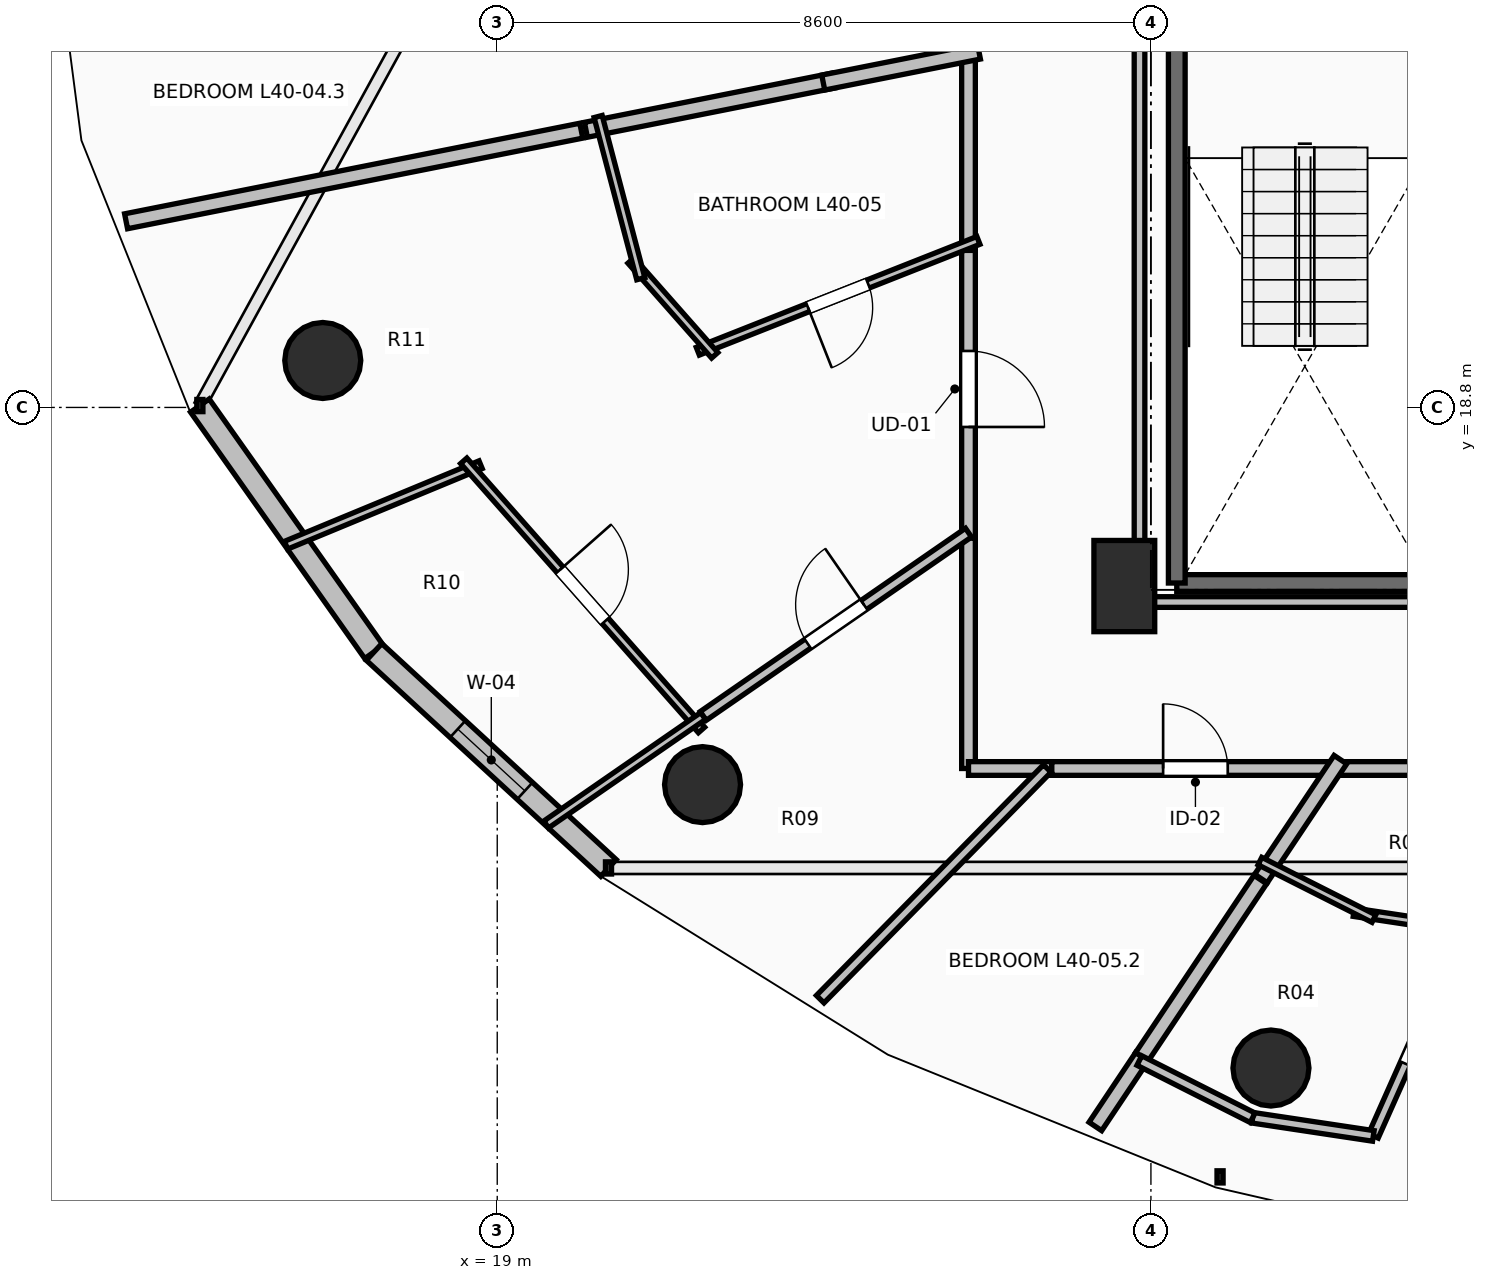
"""IFC4 building model, lengths in metres.
Left out: names, types, materials, properties, quantities, classifications, styles, units other than length and angle.
Written with IfcOpenShell. Run it as: python <this file> out.ifc"""

import sys

from ifc_helpers import new_model, si_unit, direction, frame, frame_2d, origin, origin_2d, place, context, subcontext, project, spatial, rectangle, circle, extrude, element, fill, save


model = new_model("IFC4")
c1 = context("Model", 3, precision=1e-05, world=origin(), true_north=direction((0.0, 1.0)))
c2 = subcontext(c1, "Body", "Model", "MODEL_VIEW")
j1 = project(units=[si_unit("LENGTHUNIT", "METRE"), si_unit("PLANEANGLEUNIT", "RADIAN")], contexts=[c1])
p1 = place(None, origin())
s1 = spatial("IfcSite", under=j1, at=p1, CompositionType="ELEMENT")
p2 = place(p1, origin())
s2 = spatial("IfcBuilding", under=s1, at=p2, CompositionType="ELEMENT")
p3 = place(p2, frame((0.0, 0.0, 150.1)))
s3 = spatial("IfcBuildingStorey", under=s2, at=p3, CompositionType="ELEMENT", Elevation=150.1)
for number, where, z_axis, x_axis in (
    (1, (16.705, 19.418, 0.0), (0.0, 0.0, 1.0), (-0.924, -0.383, 0.0)),
    (2, (21.701, 13.838, 0.0), (0.0, 0.0, 1.0), (-0.707, -0.707, 0.0)),
    (3, (29.179, 10.109, 0.0), (0.0, 0.0, 1.0), (-0.383, -0.924, 0.0)),
):
    element("IfcColumn", number, at=place(p3, frame(where, z_axis=z_axis, x_axis=x_axis)), inside=s3, PredefinedType="COLUMN", context=c2, shape_type="SweptSolid", body=[
        extrude(circle(Radius=0.5, at=origin_2d()), origin(), (0.0, 0.0, 1.0), 3.5),
    ])
p4 = place(p3, frame((27.25, 16.45, 0.0), z_axis=(0.0, 0.0, 1.0), x_axis=(1.0, 0.0, 0.0)))
e4 = element("IfcColumn", 4, at=p4, inside=s3, PredefinedType="PILASTER", context=c2, shape_type="SweptSolid", body=[
    extrude(rectangle(XDim=0.8, YDim=1.2, at=origin_2d()), origin(), (0.0, 0.0, 1.0), 3.5),
])
p5 = place(p3, frame((15.088, 18.825, 0.0), z_axis=(0.0, 0.0, 1.0), x_axis=(0.577269753207, -0.816553508371, 0.0)))
e5 = element("IfcWall", 5, at=p5, inside=s3, PredefinedType="STANDARD", context=c2, shape_type="SweptSolid", body=[
    extrude(rectangle(XDim=3.97, YDim=0.3, at=frame_2d((1.985, 0.0))), origin(), (0.0, 0.0, 1.0), 3.24),
])
p6 = place(p3, frame((17.38, 15.583, 0.0), z_axis=(0.0, 0.0, 1.0), x_axis=(0.735477154165, -0.677549522693, 0.0)))
e6 = element("IfcWall", 6, at=p6, inside=s3, PredefinedType="STANDARD", context=c2, shape_type="SweptSolid", body=[
    extrude(rectangle(XDim=4.194, YDim=0.3, at=frame_2d((2.097, 0.0))), origin(), (0.0, 0.0, 1.0), 3.24),
])
p7 = place(p6, frame((1.497, 0.0, 0.85)))
e7 = element("IfcOpeningElement", 7, at=p7, cuts=e6, PredefinedType="OPENING", context=c2, shape_type="SweptSolid", body=[
    extrude(rectangle(XDim=1.2, YDim=2.1, at=frame_2d((0.6, 1.05))), frame((0.0, 0.165, 0.0), z_axis=(0.0, -1.0, 0.0), x_axis=(1.0, 0.0, 0.0)), (0.0, 0.0, 1.0), 0.33),
])
p8 = place(p3, frame((31.31, 16.49, 0.0), z_axis=(0.0, 0.0, 1.0), x_axis=(-1.0, 0.0, 0.0)))
e8 = element("IfcWall", 8, at=p8, inside=s3, PredefinedType="SOLIDWALL", context=c2, shape_type="SweptSolid", body=[
    extrude(rectangle(XDim=3.37, YDim=0.22, at=frame_2d((1.685, 0.0))), origin(), (0.0, 0.0, 1.0), 3.24),
])
p9 = place(p3, frame((27.94, 16.49, 0.0), z_axis=(0.0, 0.0, 1.0), x_axis=(0.0, 1.0, 0.0)))
e9 = element("IfcWall", 9, at=p9, inside=s3, PredefinedType="SOLIDWALL", context=c2, shape_type="SweptSolid", body=[
    extrude(rectangle(XDim=7.42, YDim=0.22, at=frame_2d((3.71, 0.0))), origin(), (0.0, 0.0, 1.0), 3.24),
])
p10 = place(p3, frame((25.2, 24.55, 0.0), z_axis=(0.0, 0.0, 1.0), x_axis=(0.0, -1.0, 0.0)))
e10 = element("IfcWall", 10, at=p10, inside=s3, PredefinedType="PARTITIONING", context=c2, shape_type="SweptSolid", body=[
    extrude(rectangle(XDim=1.157, YDim=0.18, at=frame_2d((0.579, 0.0))), origin(), (0.0, 0.0, 1.0), 3.24),
])
p11 = place(p3, frame((25.2, 21.006, 0.0), z_axis=(0.0, 0.0, 1.0), x_axis=(0.0, -1.0, 0.0)))
e11 = element("IfcWall", 11, at=p11, inside=s3, PredefinedType="PARTITIONING", context=c2, shape_type="SweptSolid", body=[
    extrude(rectangle(XDim=3.926, YDim=0.18, at=frame_2d((1.963, 0.0))), origin(), (0.0, 0.0, 1.0), 2.432),
])
p12 = place(p11, frame((1.463, 0.0, 0.0)))
e12 = element("IfcOpeningElement", 12, at=p12, cuts=e11, PredefinedType="OPENING", context=c2, shape_type="SweptSolid", body=[
    extrude(rectangle(XDim=1.0, YDim=2.15, at=frame_2d((0.5, 1.075))), frame((0.0, 0.105, 0.0), z_axis=(0.0, -1.0, 0.0), x_axis=(1.0, 0.0, 0.0)), (0.0, 0.0, 1.0), 0.21),
])
p13 = place(p3, frame((25.2, 23.533, 0.0), z_axis=(0.0, 0.0, 1.0), x_axis=(0.0, -1.0, 0.0)))
e13 = element("IfcWall", 13, at=p13, inside=s3, PredefinedType="PARTITIONING", context=c2, shape_type="SweptSolid", body=[
    extrude(rectangle(XDim=2.667, YDim=0.18, at=frame_2d((1.333, 0.0))), origin(), (0.0, 0.0, 1.0), 3.24),
])
p14 = place(p3, frame((25.2, 17.08, 0.0), z_axis=(0.0, 0.0, 1.0), x_axis=(0.0, -1.0, 0.0)))
e14 = element("IfcWall", 14, at=p14, inside=s3, PredefinedType="PARTITIONING", context=c2, shape_type="SweptSolid", body=[
    extrude(rectangle(XDim=3.03, YDim=0.18, at=frame_2d((1.515, 0.0))), origin(), (0.0, 0.0, 1.0), 2.432),
])
p15 = place(p3, frame((25.2, 14.05, 0.0), z_axis=(0.0, 0.0, 1.0), x_axis=(1.0, 0.0, 0.0)))
e15 = element("IfcWall", 15, at=p15, inside=s3, PredefinedType="PARTITIONING", context=c2, shape_type="SweptSolid", body=[
    extrude(rectangle(XDim=1.096, YDim=0.18, at=frame_2d((0.548, 0.0))), origin(), (0.0, 0.0, 1.0), 2.972),
])
p16 = place(p3, frame((26.296, 14.05, 0.0), z_axis=(0.0, 0.0, 1.0), x_axis=(1.0, 0.0, 0.0)))
e16 = element("IfcWall", 16, at=p16, inside=s3, PredefinedType="PARTITIONING", context=c2, shape_type="SweptSolid", body=[
    extrude(rectangle(XDim=3.779, YDim=0.18, at=frame_2d((1.89, 0.0))), origin(), (0.0, 0.0, 1.0), 2.432),
])
p17 = place(p16, frame((1.465, 0.0, 0.0)))
e17 = element("IfcOpeningElement", 17, at=p17, cuts=e16, PredefinedType="OPENING", context=c2, shape_type="SweptSolid", body=[
    extrude(rectangle(XDim=0.85, YDim=2.1, at=frame_2d((0.425, 1.05))), frame((0.0, 0.105, 0.0), z_axis=(0.0, -1.0, 0.0), x_axis=(1.0, 0.0, 0.0)), (0.0, 0.0, 1.0), 0.21),
])
p18 = place(p3, frame((29.935, 14.05, 0.0), z_axis=(0.0, 0.0, 1.0), x_axis=(1.0, 0.0, 0.0)))
e18 = element("IfcWall", 18, at=p18, inside=s3, PredefinedType="PARTITIONING", context=c2, shape_type="SweptSolid", body=[
    extrude(rectangle(XDim=3.199, YDim=0.18, at=frame_2d((1.6, 0.0))), origin(), (0.0, 0.0, 1.0), 3.24),
])
p19 = place(p3, frame((14.117, 21.249, 0.0), z_axis=(0.0, 0.0, 1.0), x_axis=(0.980766298352, 0.19518572698, 0.0)))
e19 = element("IfcWall", 19, at=p19, inside=s3, PredefinedType="PARTITIONING", context=c2, shape_type="SweptSolid", body=[
    extrude(rectangle(XDim=6.106, YDim=0.2, at=frame_2d((3.053, 0.0))), origin(), (0.0, 0.0, 1.0), 2.728),
])
p20 = place(p3, frame((20.167, 22.453, 0.0), z_axis=(0.0, 0.0, 1.0), x_axis=(0.980766708229, 0.195183667423, 0.0)))
e20 = element("IfcWall", 20, at=p20, inside=s3, PredefinedType="PARTITIONING", context=c2, shape_type="SweptSolid", body=[
    extrude(rectangle(XDim=3.323, YDim=0.2, at=frame_2d((1.662, 0.0))), origin(), (0.0, 0.0, 1.0), 2.972),
])
p21 = place(p3, frame((23.289, 23.074, 0.0), z_axis=(0.0, 0.0, 1.0), x_axis=(0.980804842296, 0.194991951961, 0.0)))
e21 = element("IfcWall", 21, at=p21, inside=s3, PredefinedType="PARTITIONING", context=c2, shape_type="SweptSolid", body=[
    extrude(rectangle(XDim=2.088, YDim=0.2, at=frame_2d((1.044, 0.0))), origin(), (0.0, 0.0, 1.0), 2.886),
])
p22 = place(p3, frame((25.33, 20.997, 0.0), z_axis=(0.0, 0.0, 1.0), x_axis=(-0.930092731386, -0.367324803169, 0.0)))
e22 = element("IfcWall", 22, at=p22, inside=s3, PredefinedType="PARTITIONING", context=c2, shape_type="SweptSolid", body=[
    extrude(rectangle(XDim=3.969, YDim=0.11, at=frame_2d((1.984, 0.0))), origin(), (0.0, 0.0, 1.0), 2.886),
])
p23 = place(p22, frame((1.559, 0.0, 0.0)))
e23 = element("IfcOpeningElement", 23, at=p23, cuts=e22, PredefinedType="OPENING", context=c2, shape_type="SweptSolid", body=[
    extrude(rectangle(XDim=0.85, YDim=2.1, at=frame_2d((0.425, 1.05))), frame((0.0, 0.07, 0.0), z_axis=(0.0, -1.0, 0.0), x_axis=(1.0, 0.0, 0.0)), (0.0, 0.0, 1.0), 0.14),
])
p24 = place(p3, frame((21.862, 19.486, 0.0), z_axis=(0.0, 0.0, 1.0), x_axis=(-0.661645897528, 0.749816448396, 0.0)))
e24 = element("IfcWall", 24, at=p24, inside=s3, PredefinedType="PARTITIONING", context=c2, shape_type="SweptSolid", body=[
    extrude(rectangle(XDim=1.664, YDim=0.11, at=frame_2d((0.832, 0.0))), origin(), (0.0, 0.0, 1.0), 3.24),
])
p25 = place(p3, frame((20.889, 20.494, 0.0), z_axis=(0.0, 0.0, 1.0), x_axis=(-0.254389812051, 0.967101764823, 0.0)))
e25 = element("IfcWall", 25, at=p25, inside=s3, PredefinedType="PARTITIONING", context=c2, shape_type="SweptSolid", body=[
    extrude(rectangle(XDim=2.206, YDim=0.11, at=frame_2d((1.103, 0.0))), origin(), (0.0, 0.0, 1.0), 3.24),
])
p26 = place(p3, frame((16.222, 16.988, 0.0), z_axis=(0.0, 0.0, 1.0), x_axis=(0.924067287951, 0.382229835751, 0.0)))
e26 = element("IfcWall", 26, at=p26, inside=s3, PredefinedType="PARTITIONING", context=c2, shape_type="SweptSolid", body=[
    extrude(rectangle(XDim=2.77, YDim=0.11, at=frame_2d((1.385, 0.0))), origin(), (0.0, 0.0, 1.0), 2.728),
])
p27 = place(p3, frame((18.559, 18.098, 0.0), z_axis=(0.0, 0.0, 1.0), x_axis=(0.662122223318, -0.749395864272, 0.0)))
e27 = element("IfcWall", 27, at=p27, inside=s3, PredefinedType="PARTITIONING", context=c2, shape_type="SweptSolid", body=[
    extrude(rectangle(XDim=4.725, YDim=0.11, at=frame_2d((2.362, 0.0))), origin(), (0.0, 0.0, 1.0), 3.24),
])
p28 = place(p27, frame((1.912, 0.0, 0.0)))
e28 = element("IfcOpeningElement", 28, at=p28, cuts=e27, PredefinedType="OPENING", context=c2, shape_type="SweptSolid", body=[
    extrude(rectangle(XDim=0.9, YDim=2.1, at=frame_2d((0.45, 1.05))), frame((0.0, 0.07, 0.0), z_axis=(0.0, -1.0, 0.0), x_axis=(1.0, 0.0, 0.0)), (0.0, 0.0, 1.0), 0.14),
])
p29 = place(p3, frame((21.71, 14.742, 0.0), z_axis=(0.0, 0.0, 1.0), x_axis=(-0.822632807799, -0.568573006335, 0.0)))
e29 = element("IfcWall", 29, at=p29, inside=s3, PredefinedType="PARTITIONING", context=c2, shape_type="SweptSolid", body=[
    extrude(rectangle(XDim=2.512, YDim=0.11, at=frame_2d((1.256, 0.0))), origin(), (0.0, 0.0, 1.0), 2.728),
])
p30 = place(p3, frame((21.71, 14.741, 0.0), z_axis=(0.0, 0.0, 1.0), x_axis=(0.822672586971, 0.568515448027, 0.0)))
e30 = element("IfcWall", 30, at=p30, inside=s3, PredefinedType="PARTITIONING", context=c2, shape_type="SweptSolid", body=[
    extrude(rectangle(XDim=4.242, YDim=0.14, at=frame_2d((2.121, 0.0))), origin(), (0.0, 0.0, 1.0), 2.432),
])
p31 = place(p30, frame((1.671, 0.0, 0.0)))
e31 = element("IfcOpeningElement", 31, at=p31, cuts=e30, PredefinedType="OPENING", context=c2, shape_type="SweptSolid", body=[
    extrude(rectangle(XDim=0.9, YDim=2.1, at=frame_2d((0.45, 1.05))), frame((0.0, 0.085, 0.0), z_axis=(0.0, -1.0, 0.0), x_axis=(1.0, 0.0, 0.0)), (0.0, 0.0, 1.0), 0.17),
])
p32 = place(p3, frame((23.249, 11.015, 0.0), z_axis=(0.0, 0.0, 1.0), x_axis=(0.701437189486, 0.712731274188, 0.0)))
e32 = element("IfcWall", 32, at=p32, inside=s3, PredefinedType="PARTITIONING", context=c2, shape_type="SweptSolid", body=[
    extrude(rectangle(XDim=4.259, YDim=0.14, at=frame_2d((2.129, 0.0))), origin(), (0.0, 0.0, 1.0), 2.728),
])
p33 = place(p3, frame((26.869, 9.341, 0.0), z_axis=(0.0, 0.0, 1.0), x_axis=(0.555772359104, 0.831334520428, 0.0)))
e33 = element("IfcWall", 33, at=p33, inside=s3, PredefinedType="PARTITIONING", context=c2, shape_type="SweptSolid", body=[
    extrude(rectangle(XDim=1.103, YDim=0.2, at=frame_2d((0.552, 0.0))), origin(), (0.0, 0.0, 1.0), 3.24),
])
p34 = place(p3, frame((29.048, 12.603, 0.0), z_axis=(0.0, 0.0, 1.0), x_axis=(0.555448864434, 0.831550695387, 0.0)))
e34 = element("IfcWall", 34, at=p34, inside=s3, PredefinedType="PARTITIONING", context=c2, shape_type="SweptSolid", body=[
    extrude(rectangle(XDim=1.881, YDim=0.2, at=frame_2d((0.94, 0.0))), origin(), (0.0, 0.0, 1.0), 2.886),
])
p35 = place(p3, frame((27.482, 10.258, 0.0), z_axis=(0.0, 0.0, 1.0), x_axis=(0.5554636799, 0.831540798946, 0.0)))
e35 = element("IfcWall", 35, at=p35, inside=s3, PredefinedType="PARTITIONING", context=c2, shape_type="SweptSolid", body=[
    extrude(rectangle(XDim=2.803, YDim=0.2, at=frame_2d((1.402, 0.0))), origin(), (0.0, 0.0, 1.0), 2.432),
])
p36 = place(p3, frame((32.297, 11.854, 0.0), z_axis=(0.0, 0.0, 1.0), x_axis=(-0.988917131865, 0.148468536412, 0.0)))
e36 = element("IfcWall", 36, at=p36, inside=s3, PredefinedType="PARTITIONING", context=c2, shape_type="SweptSolid", body=[
    extrude(rectangle(XDim=2.051, YDim=0.11, at=frame_2d((1.025, 0.0))), origin(), (0.0, 0.0, 1.0), 3.24),
])
p37 = place(p3, frame((30.925, 7.982, 0.0), z_axis=(0.0, 0.0, 1.0), x_axis=(0.365433616255, 0.930837403691, 0.0)))
e37 = element("IfcWall", 37, at=p37, inside=s3, PredefinedType="PARTITIONING", context=c2, shape_type="SweptSolid", body=[
    extrude(rectangle(XDim=2.313, YDim=0.11, at=frame_2d((1.157, 0.0))), origin(), (0.0, 0.0, 1.0), 2.728),
])
p38 = place(p3, frame((31.738, 11.938, 0.0), z_axis=(0.0, 0.0, 1.0), x_axis=(-0.406814964782, -0.913510582549, 0.0)))
e38 = element("IfcWall", 38, at=p38, inside=s3, PredefinedType="PARTITIONING", context=c2, shape_type="SweptSolid", body=[
    extrude(rectangle(XDim=2.98, YDim=0.14, at=frame_2d((1.49, 0.0))), origin(), (0.0, 0.0, 1.0), 2.728),
])
p39 = place(p38, frame((1.04, 0.0, 0.0)))
e39 = element("IfcOpeningElement", 39, at=p39, cuts=e38, PredefinedType="OPENING", context=c2, shape_type="SweptSolid", body=[
    extrude(rectangle(XDim=0.9, YDim=2.1, at=frame_2d((0.45, 1.05))), frame((0.0, 0.085, 0.0), z_axis=(0.0, -1.0, 0.0), x_axis=(1.0, 0.0, 0.0)), (0.0, 0.0, 1.0), 0.17),
])
p40 = place(p3, frame((30.526, 9.216, 0.0), z_axis=(0.0, 0.0, 1.0), x_axis=(-0.988860390109, 0.148845990455, 0.0)))
e40 = element("IfcWall", 40, at=p40, inside=s3, PredefinedType="PARTITIONING", context=c2, shape_type="SweptSolid", body=[
    extrude(rectangle(XDim=1.606, YDim=0.14, at=frame_2d((0.803, 0.0))), origin(), (0.0, 0.0, 1.0), 3.24),
])
p41 = place(p3, frame((28.938, 9.455, 0.0), z_axis=(0.0, 0.0, 1.0), x_axis=(-0.892517956507, 0.451011859392, 0.0)))
e41 = element("IfcWall", 41, at=p41, inside=s3, PredefinedType="PARTITIONING", context=c2, shape_type="SweptSolid", body=[
    extrude(rectangle(XDim=1.669, YDim=0.14, at=frame_2d((0.835, 0.0))), origin(), (0.0, 0.0, 1.0), 3.24),
])
p42 = place(p3, frame((29.034, 12.832, 0.0), z_axis=(0.0, 0.0, 1.0), x_axis=(0.892617244745, -0.450815321816, 0.0)))
e42 = element("IfcWall", 42, at=p42, inside=s3, PredefinedType="PARTITIONING", context=c2, shape_type="SweptSolid", body=[
    extrude(rectangle(XDim=1.679, YDim=0.11, at=frame_2d((0.84, 0.0))), origin(), (0.0, 0.0, 1.0), 2.972),
])
p43 = place(p3, frame((27.45, 23.754, 0.0), z_axis=(0.0, 0.0, 1.0), x_axis=(0.0, -1.0, 0.0)))
e43 = element("IfcWall", 43, at=p43, inside=s3, PredefinedType="PARTITIONING", context=c2, shape_type="SweptSolid", body=[
    extrude(rectangle(XDim=7.514, YDim=0.14, at=frame_2d((3.757, 0.0))), origin(), (0.0, 0.0, 1.0), 2.432),
])
p44 = place(p3, frame((27.45, 16.24, 0.0), z_axis=(0.0, 0.0, 1.0), x_axis=(1.0, 0.0, 0.0)))
e44 = element("IfcWall", 44, at=p44, inside=s3, PredefinedType="PARTITIONING", context=c2, shape_type="SweptSolid", body=[
    extrude(rectangle(XDim=3.745, YDim=0.14, at=frame_2d((1.873, 0.0))), origin(), (0.0, 0.0, 1.0), 2.432),
])
p45 = place(p7, origin())
e45 = element("IfcWindow", 45, at=p45, inside=s3, PartitioningType="SINGLE_PANEL", PredefinedType="WINDOW", context=c2, shape_type="SweptSolid", body=[
    extrude(rectangle(XDim=1.2, YDim=2.1, at=frame_2d((0.6, 1.05))), frame((0.0, 0.03, 0.0), z_axis=(0.0, -1.0, 0.0), x_axis=(1.0, 0.0, 0.0)), (0.0, 0.0, 1.0), 0.06),
])
fill(e7, e45)
p46 = place(p12, origin())
e46 = element("IfcDoor", 46, at=p46, inside=s3, OperationType="SINGLE_SWING_RIGHT", PredefinedType="DOOR", context=c2, shape_type="SweptSolid", body=[
    extrude(rectangle(XDim=1.0, YDim=2.15, at=frame_2d((0.5, 1.075))), frame((0.0, 0.025, 0.0), z_axis=(0.0, -1.0, 0.0), x_axis=(1.0, 0.0, 0.0)), (0.0, 0.0, 1.0), 0.05),
])
fill(e12, e46)
p47 = place(p23, origin())
e47 = element("IfcDoor", 47, at=p47, inside=s3, OperationType="SINGLE_SWING_RIGHT", PredefinedType="DOOR", context=c2, shape_type="SweptSolid", body=[
    extrude(rectangle(XDim=0.85, YDim=2.1, at=frame_2d((0.425, 1.05))), frame((0.0, 0.025, 0.0), z_axis=(0.0, -1.0, 0.0), x_axis=(1.0, 0.0, 0.0)), (0.0, 0.0, 1.0), 0.05),
])
fill(e23, e47)
p48 = place(p28, origin())
e48 = element("IfcDoor", 48, at=p48, inside=s3, OperationType="SINGLE_SWING_LEFT", PredefinedType="DOOR", context=c2, shape_type="SweptSolid", body=[
    extrude(rectangle(XDim=0.9, YDim=2.1, at=frame_2d((0.45, 1.05))), frame((0.0, 0.025, 0.0), z_axis=(0.0, -1.0, 0.0), x_axis=(1.0, 0.0, 0.0)), (0.0, 0.0, 1.0), 0.05),
])
fill(e28, e48)
p49 = place(p31, origin())
e49 = element("IfcDoor", 49, at=p49, inside=s3, OperationType="SINGLE_SWING_RIGHT", PredefinedType="DOOR", context=c2, shape_type="SweptSolid", body=[
    extrude(rectangle(XDim=0.9, YDim=2.1, at=frame_2d((0.45, 1.05))), frame((0.0, 0.025, 0.0), z_axis=(0.0, -1.0, 0.0), x_axis=(1.0, 0.0, 0.0)), (0.0, 0.0, 1.0), 0.05),
])
fill(e31, e49)
p50 = place(p39, origin())
e50 = element("IfcDoor", 50, at=p50, inside=s3, OperationType="SINGLE_SWING_LEFT", PredefinedType="DOOR", context=c2, shape_type="SweptSolid", body=[
    extrude(rectangle(XDim=0.9, YDim=2.1, at=frame_2d((0.45, 1.05))), frame((0.0, 0.025, 0.0), z_axis=(0.0, -1.0, 0.0), x_axis=(1.0, 0.0, 0.0)), (0.0, 0.0, 1.0), 0.05),
])
fill(e39, e50)
p51 = place(p17, origin())
e51 = element("IfcDoor", 51, at=p51, inside=s3, OperationType="SINGLE_SWING_LEFT", PredefinedType="DOOR", context=c2, shape_type="SweptSolid", body=[
    extrude(rectangle(XDim=0.85, YDim=2.1, at=frame_2d((0.425, 1.05))), frame((0.0, 0.025, 0.0), z_axis=(0.0, -1.0, 0.0), x_axis=(1.0, 0.0, 0.0)), (0.0, 0.0, 1.0), 0.05),
])
fill(e17, e51)
save(model, sys.argv[1])
